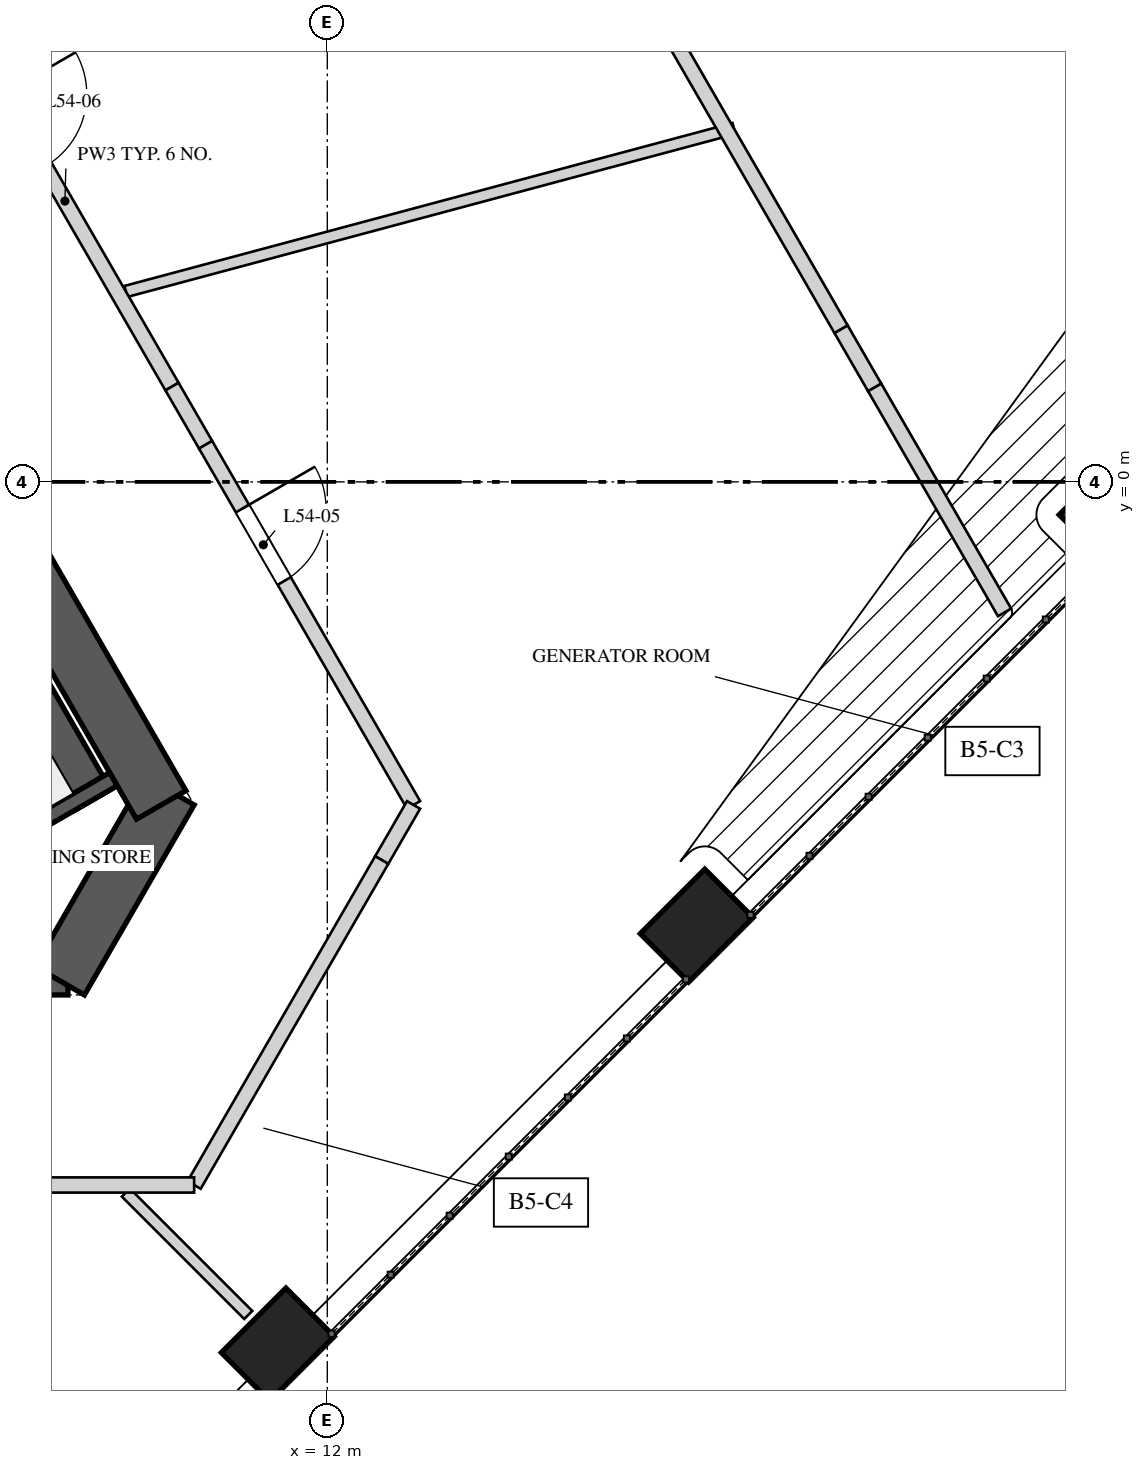
"""IFC4 building model, lengths in metres.
Left out: names, types, materials, properties, quantities, classifications, styles, units other than length and angle.
Written with IfcOpenShell. Run it as: python <this file> out.ifc"""

import sys

from ifc_helpers import new_model, si_unit, direction, frame, frame_2d, origin, origin_2d, place, context, subcontext, project, spatial, rectangle, extrude, element, fill, save


model = new_model("IFC4")
c1 = context("Model", 3, precision=1e-05, world=origin(), true_north=direction((0.0, 1.0)))
c2 = subcontext(c1, "Body", "Model", "MODEL_VIEW")
j1 = project(units=[si_unit("LENGTHUNIT", "METRE"), si_unit("PLANEANGLEUNIT", "RADIAN")], contexts=[c1])
p1 = place(None, origin())
s1 = spatial("IfcSite", under=j1, at=p1, CompositionType="ELEMENT")
p2 = place(p1, origin())
s2 = spatial("IfcBuilding", under=s1, at=p2, CompositionType="ELEMENT")
p3 = place(p2, frame((0.0, 0.0, 232.0)))
s3 = spatial("IfcBuildingStorey", under=s2, at=p3, CompositionType="ELEMENT", Elevation=232.0)
p4 = place(p3, frame((-8.588, -6.375, 0.0), z_axis=(0.0, 0.0, 1.0), x_axis=(1.0, 0.0, 0.0)))
e1 = element("IfcWall", 1, at=p4, inside=s3, PredefinedType="SHEAR", context=c2, shape_type="SweptSolid", body=[
    extrude(rectangle(XDim=17.176, YDim=0.75, at=frame_2d((8.588, 0.0))), origin(), (0.0, 0.0, 1.0), 5.2),
])
p5 = place(p4, frame((6.793, 0.0, 0.0)))
e2 = element("IfcOpeningElement", 2, at=p5, cuts=e1, PredefinedType="OPENING", context=c2, shape_type="SweptSolid", body=[
    extrude(rectangle(XDim=1.0, YDim=2.4, at=frame_2d((0.5, 1.2))), frame((0.0, 0.385, 0.0), z_axis=(0.0, -1.0, 0.0), x_axis=(1.0, 0.0, 0.0)), (0.0, 0.0, 1.0), 0.77),
])
p6 = place(p4, frame((14.864, 0.0, 0.0)))
e3 = element("IfcOpeningElement", 3, at=p6, cuts=e1, PredefinedType="OPENING", context=c2, shape_type="SweptSolid", body=[
    extrude(rectangle(XDim=0.8, YDim=2.1, at=frame_2d((0.4, 1.05))), frame((0.0, 0.385, 0.0), z_axis=(0.0, -1.0, 0.0), x_axis=(1.0, 0.0, 0.0)), (0.0, 0.0, 1.0), 0.77),
])
p7 = place(p3, frame((8.48, -6.562, 0.0), z_axis=(0.0, 0.0, 1.0), x_axis=(0.499995765644, 0.866027848477, 0.0)))
e4 = element("IfcWall", 4, at=p7, inside=s3, PredefinedType="SHEAR", context=c2, shape_type="SweptSolid", body=[
    extrude(rectangle(XDim=2.887, YDim=0.75, at=frame_2d((1.443, 0.0))), origin(), (0.0, 0.0, 1.0), 5.2),
])
p8 = place(p3, frame((9.815, -4.25, 0.0), z_axis=(0.0, 0.0, 1.0), x_axis=(-0.500002161919, 0.866024155596, 0.0)))
e5 = element("IfcWall", 5, at=p8, inside=s3, PredefinedType="SHEAR", context=c2, shape_type="SweptSolid", body=[
    extrude(rectangle(XDim=17.176, YDim=0.75, at=frame_2d((8.588, 0.0))), origin(), (0.0, 0.0, 1.0), 5.2),
])
p9 = place(p8, frame((6.863, 0.0, 0.0)))
e6 = element("IfcOpeningElement", 6, at=p9, cuts=e5, PredefinedType="OPENING", context=c2, shape_type="SweptSolid", body=[
    extrude(rectangle(XDim=1.0, YDim=2.4, at=frame_2d((0.5, 1.2))), frame((0.0, 0.385, 0.0), z_axis=(0.0, -1.0, 0.0), x_axis=(1.0, 0.0, 0.0)), (0.0, 0.0, 1.0), 0.77),
])
p10 = place(p8, frame((14.382, 0.0, 0.0)))
e7 = element("IfcOpeningElement", 7, at=p10, cuts=e5, PredefinedType="OPENING", context=c2, shape_type="SweptSolid", body=[
    extrude(rectangle(XDim=0.8, YDim=2.1, at=frame_2d((0.4, 1.05))), frame((0.0, 0.385, 0.0), z_axis=(0.0, -1.0, 0.0), x_axis=(1.0, 0.0, 0.0)), (0.0, 0.0, 1.0), 0.77),
])
for number, where, z_axis, x_axis in (
    (8, (11.349, -11.349, 0.0), (0.0, 0.0, 1.0), (0.707, 0.707, 0.0)),
    (9, (16.86, -5.838, 0.0), (0.0, 0.0, 1.0), (0.707, 0.707, 0.0)),
    (10, (22.372, -0.326, 0.0), (0.0, 0.0, 1.0), (0.707, 0.707, 0.0)),
):
    element("IfcColumn", number, at=place(p3, frame(where, z_axis=z_axis, x_axis=x_axis)), inside=s3, PredefinedType="COLUMN", context=c2, shape_type="SweptSolid", body=[
        extrude(rectangle(XDim=1.2, YDim=0.9, at=origin_2d()), origin(), (0.0, 0.0, 1.0), 2.806),
    ])
p11 = place(p3, frame((8.911, -4.185, 0.0), z_axis=(0.0, 0.0, 1.0), x_axis=(-0.500009909098, 0.866019682689, 0.0)))
e11 = element("IfcWall", 11, at=p11, inside=s3, PredefinedType="SOLIDWALL", context=c2, shape_type="SweptSolid", body=[
    extrude(rectangle(XDim=6.2, YDim=0.55, at=frame_2d((3.1, 0.0))), origin(), (0.0, 0.0, 1.0), 4.85),
])
p12 = place(p3, frame((6.501, -5.461, 0.0), z_axis=(0.0, 0.0, 1.0), x_axis=(0.86600983753, 0.500026960575, 0.0)))
e12 = element("IfcWall", 12, at=p12, inside=s3, PredefinedType="SOLIDWALL", context=c2, shape_type="SweptSolid", body=[
    extrude(rectangle(XDim=3.1, YDim=0.2, at=frame_2d((1.55, 0.0))), origin(), (0.0, 0.0, 1.0), 4.85),
])
p13 = place(p3, frame((9.35, -9.35, 0.0), z_axis=(0.0, 0.0, 1.0), x_axis=(0.707106781187, -0.707106781187, 0.0)))
e13 = element("IfcWall", 13, at=p13, inside=s3, PredefinedType="PARTITIONING", context=c2, shape_type="SweptSolid", body=[
    extrude(rectangle(XDim=2.277, YDim=0.15, at=frame_2d((1.139, 0.0))), origin(), (0.0, 0.0, 1.0), 4.85),
])
p14 = place(p3, frame((9.35, 2.505, 0.0), z_axis=(0.0, 0.0, 1.0), x_axis=(0.965925024381, 0.258822037845, 0.0)))
e14 = element("IfcWall", 14, at=p14, inside=s3, PredefinedType="PARTITIONING", context=c2, shape_type="SweptSolid", body=[
    extrude(rectangle(XDim=8.282, YDim=0.15, at=frame_2d((4.141, 0.0))), origin(), (0.0, 0.0, 1.0), 4.85),
])
p15 = place(p3, frame((7.139, 6.135, 0.0), z_axis=(0.0, 0.0, 1.0), x_axis=(0.500006198144, -0.866021825255, 0.0)))
e15 = element("IfcWall", 15, at=p15, inside=s3, PredefinedType="SOLIDWALL", context=c2, shape_type="SweptSolid", body=[
    extrude(rectangle(XDim=5.636, YDim=0.2, at=frame_2d((2.818, 0.0))), origin(), (0.0, 0.0, 1.0), 4.85),
])
p16 = place(p15, frame((1.193, 0.0, 0.0)))
e16 = element("IfcOpeningElement", 16, at=p16, cuts=e15, PredefinedType="OPENING", context=c2, shape_type="SweptSolid", body=[
    extrude(rectangle(XDim=1.1, YDim=2.2, at=frame_2d((0.55, 1.1))), frame((0.0, 0.11, 0.0), z_axis=(0.0, -1.0, 0.0), x_axis=(1.0, 0.0, 0.0)), (0.0, 0.0, 1.0), 0.22),
])
p17 = place(p3, frame((9.957, 1.254, 0.0), z_axis=(0.0, 0.0, 1.0), x_axis=(0.499913830031, -0.866075148324, 0.0)))
e17 = element("IfcWall", 17, at=p17, inside=s3, PredefinedType="SOLIDWALL", context=c2, shape_type="SweptSolid", body=[
    extrude(rectangle(XDim=0.884, YDim=0.2, at=frame_2d((0.442, 0.0))), origin(), (0.0, 0.0, 1.0), 3.95),
])
p18 = place(p3, frame((10.399, 0.489, 0.0), z_axis=(0.0, 0.0, 1.0), x_axis=(0.500021123982, -0.866013207504, 0.0)))
e18 = element("IfcWall", 18, at=p18, inside=s3, PredefinedType="SOLIDWALL", context=c2, shape_type="SweptSolid", body=[
    extrude(rectangle(XDim=5.472, YDim=0.2, at=frame_2d((2.736, 0.0))), origin(), (0.0, 0.0, 1.0), 4.85),
])
p19 = place(p18, frame((0.97, 0.0, 0.0)))
e19 = element("IfcOpeningElement", 19, at=p19, cuts=e18, PredefinedType="OPENING", context=c2, shape_type="SweptSolid", body=[
    extrude(rectangle(XDim=1.1, YDim=2.2, at=frame_2d((0.55, 1.1))), frame((0.0, 0.11, 0.0), z_axis=(0.0, -1.0, 0.0), x_axis=(1.0, 0.0, 0.0)), (0.0, 0.0, 1.0), 0.22),
])
p20 = place(p3, frame((13.135, -4.25, 0.0), z_axis=(0.0, 0.0, 1.0), x_axis=(-0.499966538646, -0.866044721844, 0.0)))
e20 = element("IfcWall", 20, at=p20, inside=s3, PredefinedType="SOLIDWALL", context=c2, shape_type="SweptSolid", body=[
    extrude(rectangle(XDim=0.837, YDim=0.2, at=frame_2d((0.418, 0.0))), origin(), (0.0, 0.0, 1.0), 4.15),
])
p21 = place(p3, frame((12.716, -4.975, 0.0), z_axis=(0.0, 0.0, 1.0), x_axis=(-0.500000720929, -0.866024987556, 0.0)))
e21 = element("IfcWall", 21, at=p21, inside=s3, PredefinedType="SOLIDWALL", context=c2, shape_type="SweptSolid", body=[
    extrude(rectangle(XDim=4.937, YDim=0.2, at=frame_2d((2.468, 0.0))), origin(), (0.0, 0.0, 1.0), 4.85),
])
p22 = place(p3, frame((10.248, -9.25, 0.0), z_axis=(0.0, 0.0, 1.0), x_axis=(-1.0, 0.0, 0.0)))
e22 = element("IfcWall", 22, at=p22, inside=s3, PredefinedType="SOLIDWALL", context=c2, shape_type="SweptSolid", body=[
    extrude(rectangle(XDim=2.604, YDim=0.2, at=frame_2d((1.302, 0.0))), origin(), (0.0, 0.0, 1.0), 4.85),
])
p23 = place(p3, frame((13.136, 11.748, 0.0), z_axis=(0.0, 0.0, 1.0), x_axis=(0.499993666936, -0.86602906015, 0.0)))
e23 = element("IfcWall", 23, at=p23, inside=s3, PredefinedType="SOLIDWALL", context=c2, shape_type="SweptSolid", body=[
    extrude(rectangle(XDim=11.247, YDim=0.2, at=frame_2d((5.624, 0.0))), origin(), (0.0, 0.0, 1.0), 4.85),
])
p24 = place(p3, frame((18.76, 2.008, 0.0), z_axis=(0.0, 0.0, 1.0), x_axis=(0.499913830031, -0.866075148324, 0.0)))
e24 = element("IfcWall", 24, at=p24, inside=s3, PredefinedType="SOLIDWALL", context=c2, shape_type="SweptSolid", body=[
    extrude(rectangle(XDim=0.884, YDim=0.2, at=frame_2d((0.442, 0.0))), origin(), (0.0, 0.0, 1.0), 3.95),
])
p25 = place(p3, frame((19.201, 1.242, 0.0), z_axis=(0.0, 0.0, 1.0), x_axis=(0.50004193257, -0.86600119265, 0.0)))
e25 = element("IfcWall", 25, at=p25, inside=s3, PredefinedType="SOLIDWALL", context=c2, shape_type="SweptSolid", body=[
    extrude(rectangle(XDim=3.418, YDim=0.2, at=frame_2d((1.709, 0.0))), origin(), (0.0, 0.0, 1.0), 4.85),
])
p26 = place(p19, origin())
e26 = element("IfcDoor", 26, at=p26, inside=s3, OperationType="SINGLE_SWING_LEFT", PredefinedType="DOOR", context=c2, shape_type="SweptSolid", body=[
    extrude(rectangle(XDim=1.1, YDim=2.2, at=frame_2d((0.55, 1.1))), frame((0.0, 0.025, 0.0), z_axis=(0.0, -1.0, 0.0), x_axis=(1.0, 0.0, 0.0)), (0.0, 0.0, 1.0), 0.05),
])
fill(e19, e26)
save(model, sys.argv[1])
